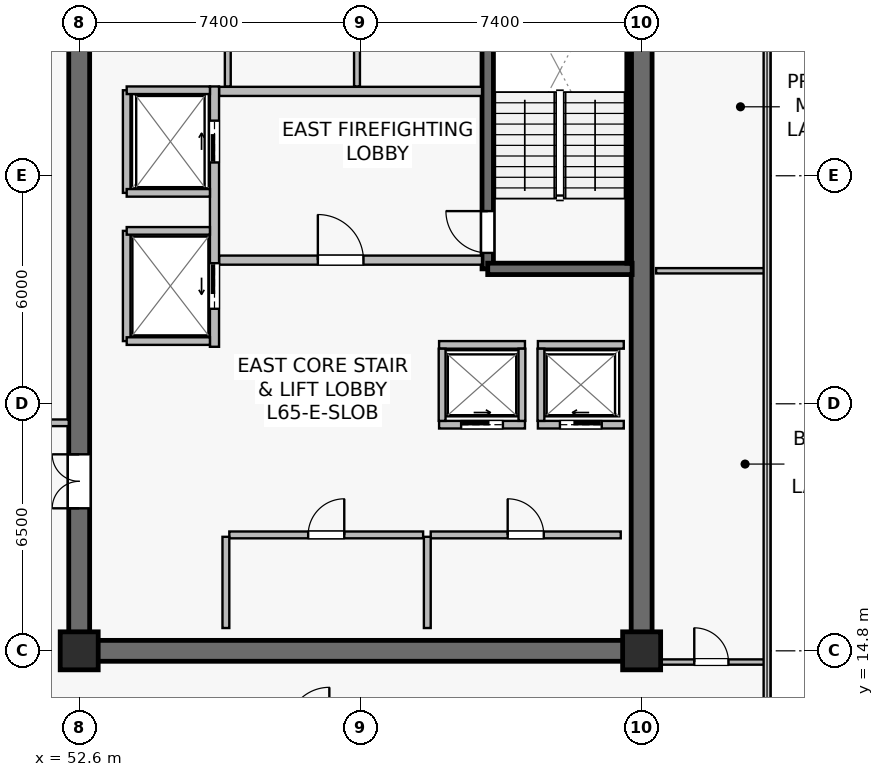
"""IFC4 building model, lengths in metres.
Left out: names, types, materials, properties, quantities, classifications, styles, units other than length and angle.
Written with IfcOpenShell. Run it as: python <this file> out.ifc"""

import sys

from ifc_helpers import new_model, si_unit, direction, frame, frame_2d, origin, origin_2d, place, context, subcontext, project, spatial, rectangle, extrude, source, transform, mapped, element, fill, save


model = new_model("IFC4")
c1 = context("Model", 3, precision=1e-05, world=origin(), true_north=direction((0.0, 1.0)))
c2 = subcontext(c1, "Body", "Model", "MODEL_VIEW")
j1 = project(units=[si_unit("LENGTHUNIT", "METRE"), si_unit("PLANEANGLEUNIT", "RADIAN")], contexts=[c1])
p1 = place(None, origin())
s1 = spatial("IfcSite", under=j1, at=p1, CompositionType="ELEMENT")
p2 = place(p1, origin())
s2 = spatial("IfcBuilding", under=s1, at=p2, CompositionType="ELEMENT")
p3 = place(p2, frame((0.0, 0.0, 271.1)))
s3 = spatial("IfcBuildingStorey", under=s2, at=p3, CompositionType="ELEMENT", Elevation=271.1)
p4 = place(p3, frame((52.325, 14.8, 0.0), z_axis=(0.0, 0.0, 1.0), x_axis=(1.0, 0.0, 0.0)))
e1 = element("IfcWall", 1, at=p4, inside=s3, PredefinedType="SHEAR", context=c2, shape_type="SweptSolid", body=[
    extrude(rectangle(XDim=15.35, YDim=0.55, at=frame_2d((7.675, 0.0))), origin(), (0.0, 0.0, 1.0), 3.8),
])
p5 = place(p3, frame((52.6, 15.075, 0.0), z_axis=(0.0, 0.0, 1.0), x_axis=(0.0, 1.0, 0.0)))
e2 = element("IfcWall", 2, at=p5, inside=s3, PredefinedType="SHEAR", context=c2, shape_type="SweptSolid", body=[
    extrude(rectangle(XDim=18.45, YDim=0.55, at=frame_2d((9.225, 0.0))), origin(), (0.0, 0.0, 1.0), 3.8),
])
p6 = place(p5, frame((3.475, 0.0, 0.0)))
e3 = element("IfcOpeningElement", 3, at=p6, cuts=e2, PredefinedType="OPENING", context=c2, shape_type="SweptSolid", body=[
    extrude(rectangle(XDim=1.42, YDim=2.2, at=frame_2d((0.71, 1.1))), frame((0.0, 0.285, 0.0), z_axis=(0.0, -1.0, 0.0), x_axis=(1.0, 0.0, 0.0)), (0.0, 0.0, 1.0), 0.57),
])
p7 = place(p3, frame((67.4, 15.075, 0.0), z_axis=(0.0, 0.0, 1.0), x_axis=(0.0, 1.0, 0.0)))
e4 = element("IfcWall", 4, at=p7, inside=s3, PredefinedType="SHEAR", context=c2, shape_type="SweptSolid", body=[
    extrude(rectangle(XDim=18.45, YDim=0.55, at=frame_2d((9.225, 0.0))), origin(), (0.0, 0.0, 1.0), 3.8),
])
p8 = place(p3, frame((63.35, 24.85, 0.0), z_axis=(0.0, 0.0, 1.0), x_axis=(0.0, 1.0, 0.0)))
e5 = element("IfcWall", 5, at=p8, inside=s3, PredefinedType="SHEAR", context=c2, shape_type="SweptSolid", body=[
    extrude(rectangle(XDim=8.63, YDim=0.3, at=frame_2d((4.315, 0.0))), origin(), (0.0, 0.0, 1.0), 3.8),
])
p9 = place(p8, frame((0.42, 0.0, 0.0)))
e6 = element("IfcOpeningElement", 6, at=p9, cuts=e5, PredefinedType="OPENING", context=c2, shape_type="SweptSolid", body=[
    extrude(rectangle(XDim=1.1, YDim=2.15, at=frame_2d((0.55, 1.075))), frame((0.0, 0.16, 0.0), z_axis=(0.0, -1.0, 0.0), x_axis=(1.0, 0.0, 0.0)), (0.0, 0.0, 1.0), 0.32),
])
p10 = place(p3, frame((63.35, 24.85, 0.0), z_axis=(0.0, 0.0, 1.0), x_axis=(1.0, 0.0, 0.0)))
e7 = element("IfcWall", 7, at=p10, inside=s3, PredefinedType="SHEAR", context=c2, shape_type="SweptSolid", body=[
    extrude(rectangle(XDim=3.8, YDim=0.3, at=frame_2d((1.9, 0.0))), origin(), (0.0, 0.0, 1.0), 3.8),
])
p11 = place(p3, frame((67.07, 25.0, 0.0), z_axis=(0.0, 0.0, 1.0), x_axis=(0.0, 1.0, 0.0)))
e8 = element("IfcWall", 8, at=p11, inside=s3, PredefinedType="SOLIDWALL", context=c2, shape_type="SweptSolid", body=[
    extrude(rectangle(XDim=8.32, YDim=0.12, at=frame_2d((4.16, 0.0))), origin(), (0.0, 0.0, 1.0), 3.8),
])
m1 = source(origin(), c2, "Body", "SweptSolid", [
    extrude(rectangle(XDim=1.0, YDim=1.0, at=origin_2d()), origin(), (0.0, 0.0, 1.0), 4.1),
])
for number, where, z_axis, x_axis in (
    (9, (52.6, 14.8, 0.0), (0.0, 0.0, 1.0), (1.0, 0.0, 0.0)),
    (10, (67.4, 14.8, 0.0), (0.0, 0.0, 1.0), (1.0, 0.0, 0.0)),
):
    element("IfcColumn", number, at=place(p3, frame(where, z_axis=z_axis, x_axis=x_axis)), inside=s3, PredefinedType="COLUMN", context=c2, shape_type="MappedRepresentation", body=[
        mapped(m1, transform((0.0, 0.0, 0.0), scale=1.0)),
    ])
p12 = place(p3, frame((56.28, 25.08, 0.0), z_axis=(0.0, 0.0, 1.0), x_axis=(1.0, 0.0, 0.0)))
e11 = element("IfcWall", 11, at=p12, inside=s3, PredefinedType="SOLIDWALL", context=c2, shape_type="SweptSolid", body=[
    extrude(rectangle(XDim=6.92, YDim=0.24, at=frame_2d((3.46, 0.0))), origin(), (0.0, 0.0, 1.0), 3.197),
])
p13 = place(p12, frame((2.6, 0.0, 0.0)))
e12 = element("IfcOpeningElement", 12, at=p13, cuts=e11, PredefinedType="OPENING", context=c2, shape_type="SweptSolid", body=[
    extrude(rectangle(XDim=1.2, YDim=2.16, at=frame_2d((0.6, 1.08))), frame((0.0, 0.13, 0.0), z_axis=(0.0, -1.0, 0.0), x_axis=(1.0, 0.0, 0.0)), (0.0, 0.0, 1.0), 0.26),
])
p14 = place(p3, frame((56.28, 29.52, 0.0), z_axis=(0.0, 0.0, 1.0), x_axis=(1.0, 0.0, 0.0)))
e13 = element("IfcWall", 13, at=p14, inside=s3, PredefinedType="SOLIDWALL", context=c2, shape_type="SweptSolid", body=[
    extrude(rectangle(XDim=6.92, YDim=0.24, at=frame_2d((3.46, 0.0))), origin(), (0.0, 0.0, 1.0), 3.197),
])
p15 = place(p3, frame((56.16, 22.8, 0.0), z_axis=(0.0, 0.0, 1.0), x_axis=(0.0, 1.0, 0.0)))
e14 = element("IfcWall", 14, at=p15, inside=s3, PredefinedType="SOLIDWALL", context=c2, shape_type="SweptSolid", body=[
    extrude(rectangle(XDim=6.85, YDim=0.24, at=frame_2d((3.425, 0.0))), origin(), (0.0, 0.0, 1.0), 2.935),
])
p16 = place(p15, frame((4.85, 0.0, 0.0)))
e15 = element("IfcOpeningElement", 15, at=p16, cuts=e14, PredefinedType="OPENING", context=c2, shape_type="SweptSolid", body=[
    extrude(rectangle(XDim=1.1, YDim=2.22, at=frame_2d((0.55, 1.11))), frame((0.0, 0.13, 0.0), z_axis=(0.0, -1.0, 0.0), x_axis=(1.0, 0.0, 0.0)), (0.0, 0.0, 1.0), 0.26),
])
p17 = place(p15, frame((1.0, 0.0, 0.0)))
e16 = element("IfcOpeningElement", 16, at=p17, cuts=e14, PredefinedType="OPENING", context=c2, shape_type="SweptSolid", body=[
    extrude(rectangle(XDim=1.2, YDim=2.22, at=frame_2d((0.6, 1.11))), frame((0.0, 0.13, 0.0), z_axis=(0.0, -1.0, 0.0), x_axis=(1.0, 0.0, 0.0)), (0.0, 0.0, 1.0), 0.26),
])
p18 = place(p3, frame((64.67, 20.75, 0.0), z_axis=(0.0, 0.0, 1.0), x_axis=(1.0, 0.0, 0.0)))
e17 = element("IfcWall", 17, at=p18, inside=s3, PredefinedType="SOLIDWALL", context=c2, shape_type="SweptSolid", body=[
    extrude(rectangle(XDim=2.26, YDim=0.2, at=frame_2d((1.13, 0.0))), origin(), (0.0, 0.0, 1.0), 3.8),
])
p19 = place(p18, frame((0.58, 0.0, 0.0)))
e18 = element("IfcOpeningElement", 18, at=p19, cuts=e17, PredefinedType="OPENING", context=c2, shape_type="SweptSolid", body=[
    extrude(rectangle(XDim=1.1, YDim=2.22, at=frame_2d((0.55, 1.11))), frame((0.0, 0.11, 0.0), z_axis=(0.0, -1.0, 0.0), x_axis=(1.0, 0.0, 0.0)), (0.0, 0.0, 1.0), 0.22),
])
p20 = place(p3, frame((64.67, 22.85, 0.0), z_axis=(0.0, 0.0, 1.0), x_axis=(1.0, 0.0, 0.0)))
e19 = element("IfcWall", 19, at=p20, inside=s3, PredefinedType="SOLIDWALL", context=c2, shape_type="SweptSolid", body=[
    extrude(rectangle(XDim=2.26, YDim=0.2, at=frame_2d((1.13, 0.0))), origin(), (0.0, 0.0, 1.0), 3.8),
])
p21 = place(p3, frame((64.75, 20.85, 0.0), z_axis=(0.0, 0.0, 1.0), x_axis=(0.0, 1.0, 0.0)))
e20 = element("IfcWall", 20, at=p21, inside=s3, PredefinedType="SOLIDWALL", context=c2, shape_type="SweptSolid", body=[
    extrude(rectangle(XDim=1.9, YDim=0.18, at=frame_2d((0.95, 0.0))), origin(), (0.0, 0.0, 1.0), 3.8),
])
p22 = place(p3, frame((62.07, 20.75, 0.0), z_axis=(0.0, 0.0, 1.0), x_axis=(1.0, 0.0, 0.0)))
e21 = element("IfcWall", 21, at=p22, inside=s3, PredefinedType="SOLIDWALL", context=c2, shape_type="SweptSolid", body=[
    extrude(rectangle(XDim=2.26, YDim=0.2, at=frame_2d((1.13, 0.0))), origin(), (0.0, 0.0, 1.0), 3.8),
])
p23 = place(p22, frame((0.58, 0.0, 0.0)))
e22 = element("IfcOpeningElement", 22, at=p23, cuts=e21, PredefinedType="OPENING", context=c2, shape_type="SweptSolid", body=[
    extrude(rectangle(XDim=1.1, YDim=2.22, at=frame_2d((0.55, 1.11))), frame((0.0, 0.11, 0.0), z_axis=(0.0, -1.0, 0.0), x_axis=(1.0, 0.0, 0.0)), (0.0, 0.0, 1.0), 0.22),
])
p24 = place(p3, frame((62.07, 22.85, 0.0), z_axis=(0.0, 0.0, 1.0), x_axis=(1.0, 0.0, 0.0)))
e23 = element("IfcWall", 23, at=p24, inside=s3, PredefinedType="SOLIDWALL", context=c2, shape_type="SweptSolid", body=[
    extrude(rectangle(XDim=2.26, YDim=0.2, at=frame_2d((1.13, 0.0))), origin(), (0.0, 0.0, 1.0), 3.8),
])
for number, where, z_axis, x_axis in (
    (24, (62.15, 20.85, 0.0), (0.0, 0.0, 1.0), (0.0, 1.0, 0.0)),
    (25, (64.25, 20.85, 0.0), (0.0, 0.0, 1.0), (0.0, 1.0, 0.0)),
):
    element("IfcWall", number, at=place(p3, frame(where, z_axis=z_axis, x_axis=x_axis)), inside=s3, PredefinedType="SOLIDWALL", context=c2, shape_type="SweptSolid", body=[
        extrude(rectangle(XDim=1.9, YDim=0.18, at=frame_2d((0.95, 0.0))), origin(), (0.0, 0.0, 1.0), 3.8),
    ])
p25 = place(p3, frame((53.85, 26.85, 0.0), z_axis=(0.0, 0.0, 1.0), x_axis=(0.0, 1.0, 0.0)))
e26 = element("IfcWall", 26, at=p25, inside=s3, PredefinedType="SOLIDWALL", context=c2, shape_type="SweptSolid", body=[
    extrude(rectangle(XDim=2.7, YDim=0.2, at=frame_2d((1.35, 0.0))), origin(), (0.0, 0.0, 1.0), 3.8),
])
p26 = place(p3, frame((53.85, 29.55, 0.0), z_axis=(0.0, 0.0, 1.0), x_axis=(1.0, 0.0, 0.0)))
e27 = element("IfcWall", 27, at=p26, inside=s3, PredefinedType="SOLIDWALL", context=c2, shape_type="SweptSolid", body=[
    extrude(rectangle(XDim=2.19, YDim=0.2, at=frame_2d((1.095, 0.0))), origin(), (0.0, 0.0, 1.0), 3.8),
])
p27 = place(p3, frame((53.85, 26.85, 0.0), z_axis=(0.0, 0.0, 1.0), x_axis=(1.0, 0.0, 0.0)))
e28 = element("IfcWall", 28, at=p27, inside=s3, PredefinedType="SOLIDWALL", context=c2, shape_type="SweptSolid", body=[
    extrude(rectangle(XDim=2.19, YDim=0.2, at=frame_2d((1.095, 0.0))), origin(), (0.0, 0.0, 1.0), 3.197),
])
p28 = place(p3, frame((53.85, 22.95, 0.0), z_axis=(0.0, 0.0, 1.0), x_axis=(0.0, 1.0, 0.0)))
e29 = element("IfcWall", 29, at=p28, inside=s3, PredefinedType="SOLIDWALL", context=c2, shape_type="SweptSolid", body=[
    extrude(rectangle(XDim=2.9, YDim=0.2, at=frame_2d((1.45, 0.0))), origin(), (0.0, 0.0, 1.0), 2.935),
])
for number, where, z_axis, x_axis in (
    (30, (53.85, 25.85, 0.0), (0.0, 0.0, 1.0), (1.0, 0.0, 0.0)),
    (31, (53.85, 22.95, 0.0), (0.0, 0.0, 1.0), (1.0, 0.0, 0.0)),
):
    element("IfcWall", number, at=place(p3, frame(where, z_axis=z_axis, x_axis=x_axis)), inside=s3, PredefinedType="SOLIDWALL", context=c2, shape_type="SweptSolid", body=[
        extrude(rectangle(XDim=2.19, YDim=0.2, at=frame_2d((1.095, 0.0))), origin(), (0.0, 0.0, 1.0), 3.8),
    ])
p29 = place(p3, frame((61.85, 17.85, 0.0), z_axis=(0.0, 0.0, 1.0), x_axis=(1.0, 0.0, 0.0)))
e32 = element("IfcWall", 32, at=p29, inside=s3, PredefinedType="SOLIDWALL", context=c2, shape_type="SweptSolid", body=[
    extrude(rectangle(XDim=5.0, YDim=0.18, at=frame_2d((2.5, 0.0))), origin(), (0.0, 0.0, 1.0), 3.8),
])
p30 = place(p29, frame((2.025, 0.0, 0.0)))
e33 = element("IfcOpeningElement", 33, at=p30, cuts=e32, PredefinedType="OPENING", context=c2, shape_type="SweptSolid", body=[
    extrude(rectangle(XDim=0.95, YDim=2.15, at=frame_2d((0.475, 1.075))), frame((0.0, 0.1, 0.0), z_axis=(0.0, -1.0, 0.0), x_axis=(1.0, 0.0, 0.0)), (0.0, 0.0, 1.0), 0.2),
])
p31 = place(p3, frame((61.76, 15.4, 0.0), z_axis=(0.0, 0.0, 1.0), x_axis=(0.0, 1.0, 0.0)))
e34 = element("IfcWall", 34, at=p31, inside=s3, PredefinedType="SOLIDWALL", context=c2, shape_type="SweptSolid", body=[
    extrude(rectangle(XDim=2.4, YDim=0.18, at=frame_2d((1.2, 0.0))), origin(), (0.0, 0.0, 1.0), 3.8),
])
p32 = place(p3, frame((56.55, 17.85, 0.0), z_axis=(0.0, 0.0, 1.0), x_axis=(1.0, 0.0, 0.0)))
e35 = element("IfcWall", 35, at=p32, inside=s3, PredefinedType="SOLIDWALL", context=c2, shape_type="SweptSolid", body=[
    extrude(rectangle(XDim=5.1, YDim=0.18, at=frame_2d((2.55, 0.0))), origin(), (0.0, 0.0, 1.0), 3.197),
])
p33 = place(p32, frame((2.075, 0.0, 0.0)))
e36 = element("IfcOpeningElement", 36, at=p33, cuts=e35, PredefinedType="OPENING", context=c2, shape_type="SweptSolid", body=[
    extrude(rectangle(XDim=0.95, YDim=2.15, at=frame_2d((0.475, 1.075))), frame((0.0, 0.1, 0.0), z_axis=(0.0, -1.0, 0.0), x_axis=(1.0, 0.0, 0.0)), (0.0, 0.0, 1.0), 0.2),
])
p34 = place(p3, frame((56.46, 15.4, 0.0), z_axis=(0.0, 0.0, 1.0), x_axis=(0.0, 1.0, 0.0)))
e37 = element("IfcWall", 37, at=p34, inside=s3, PredefinedType="SOLIDWALL", context=c2, shape_type="SweptSolid", body=[
    extrude(rectangle(XDim=2.4, YDim=0.18, at=frame_2d((1.2, 0.0))), origin(), (0.0, 0.0, 1.0), 3.8),
])
p35 = place(p3, frame((59.91, 29.65, 0.0), z_axis=(0.0, 0.0, 1.0), x_axis=(0.0, 1.0, 0.0)))
e38 = element("IfcWall", 38, at=p35, inside=s3, PredefinedType="PLUMBINGWALL", context=c2, shape_type="SweptSolid", body=[
    extrude(rectangle(XDim=3.93, YDim=0.155, at=frame_2d((1.965, 0.0))), origin(), (0.0, 0.0, 1.0), 3.197),
])
p36 = place(p3, frame((56.51, 29.65, 0.0), z_axis=(0.0, 0.0, 1.0), x_axis=(0.0, 1.0, 0.0)))
e39 = element("IfcWall", 39, at=p36, inside=s3, PredefinedType="PLUMBINGWALL", context=c2, shape_type="SweptSolid", body=[
    extrude(rectangle(XDim=3.93, YDim=0.155, at=frame_2d((1.965, 0.0))), origin(), (0.0, 0.0, 1.0), 3.8),
])
p37 = place(p3, frame((48.3, 20.8, 0.0), z_axis=(0.0, 0.0, 1.0), x_axis=(1.0, 0.0, 0.0)))
e40 = element("IfcWall", 40, at=p37, inside=s3, PredefinedType="PARTITIONING", context=c2, shape_type="SweptSolid", body=[
    extrude(rectangle(XDim=4.025, YDim=0.175, at=frame_2d((2.012, 0.0))), origin(), (0.0, 0.0, 1.0), 3.8),
])
p38 = place(p37, frame((1.35, 0.0, 0.0)))
e41 = element("IfcOpeningElement", 41, at=p38, cuts=e40, PredefinedType="OPENING", context=c2, shape_type="SweptSolid", body=[
    extrude(rectangle(XDim=0.95, YDim=2.15, at=frame_2d((0.475, 1.075))), frame((0.0, 0.098, 0.0), z_axis=(0.0, -1.0, 0.0), x_axis=(1.0, 0.0, 0.0)), (0.0, 0.0, 1.0), 0.195),
])
p39 = place(p3, frame((67.78, 24.8, 0.0), z_axis=(0.0, 0.0, 1.0), x_axis=(1.0, 0.0, 0.0)))
e42 = element("IfcWall", 42, at=p39, inside=s3, PredefinedType="PARTITIONING", context=c2, shape_type="SweptSolid", body=[
    extrude(rectangle(XDim=2.91, YDim=0.14, at=frame_2d((1.455, 0.0))), origin(), (0.0, 0.0, 1.0), 3.8),
])
p40 = place(p3, frame((67.78, 14.505, 0.0), z_axis=(0.0, 0.0, 1.0), x_axis=(1.0, 0.0, 0.0)))
e43 = element("IfcWall", 43, at=p40, inside=s3, PredefinedType="PARTITIONING", context=c2, shape_type="SweptSolid", body=[
    extrude(rectangle(XDim=2.91, YDim=0.14, at=frame_2d((1.455, 0.0))), origin(), (0.0, 0.0, 1.0), 3.8),
])
p41 = place(p40, frame((1.005, 0.0, 0.0)))
e44 = element("IfcOpeningElement", 44, at=p41, cuts=e43, PredefinedType="OPENING", context=c2, shape_type="SweptSolid", body=[
    extrude(rectangle(XDim=0.9, YDim=2.1, at=frame_2d((0.45, 1.05))), frame((0.0, 0.08, 0.0), z_axis=(0.0, -1.0, 0.0), x_axis=(1.0, 0.0, 0.0)), (0.0, 0.0, 1.0), 0.16),
])
m2 = source(origin(), c2, "Body", "SweptSolid", [
    extrude(rectangle(XDim=1.1, YDim=2.15, at=frame_2d((0.55, 1.075))), frame((0.0, 0.025, 0.0), z_axis=(0.0, -1.0, 0.0), x_axis=(1.0, 0.0, 0.0)), (0.0, 0.0, 1.0), 0.05),
])
p42 = place(p9, origin())
e45 = element("IfcDoor", 45, at=p42, inside=s3, OperationType="SINGLE_SWING_RIGHT", PredefinedType="DOOR", context=c2, shape_type="MappedRepresentation", body=[
    mapped(m2, transform((0.0, 0.0, 0.0), scale=1.0)),
])
fill(e6, e45)
m3 = source(origin(), c2, "Body", "SweptSolid", [
    extrude(rectangle(XDim=1.2, YDim=2.16, at=frame_2d((0.6, 1.08))), frame((0.0, 0.025, 0.0), z_axis=(0.0, -1.0, 0.0), x_axis=(1.0, 0.0, 0.0)), (0.0, 0.0, 1.0), 0.05),
])
p43 = place(p13, origin())
e46 = element("IfcDoor", 46, at=p43, inside=s3, OperationType="SINGLE_SWING_LEFT", PredefinedType="DOOR", context=c2, shape_type="MappedRepresentation", body=[
    mapped(m3, transform((0.0, 0.0, 0.0), scale=1.0)),
])
fill(e12, e46)
m4 = source(origin(), c2, "Body", "SweptSolid", [
    extrude(rectangle(XDim=1.1, YDim=2.22, at=frame_2d((0.55, 1.11))), frame((0.0, 0.025, 0.0), z_axis=(0.0, -1.0, 0.0), x_axis=(1.0, 0.0, 0.0)), (0.0, 0.0, 1.0), 0.05),
])
p44 = place(p19, origin())
e47 = element("IfcDoor", 47, at=p44, inside=s3, OperationType="SLIDING_TO_LEFT", PredefinedType="USERDEFINED", context=c2, shape_type="MappedRepresentation", body=[
    mapped(m4, transform((0.0, 0.0, 0.0), scale=1.0)),
])
fill(e18, e47)
p45 = place(p23, origin())
e48 = element("IfcDoor", 48, at=p45, inside=s3, OperationType="SLIDING_TO_RIGHT", PredefinedType="USERDEFINED", context=c2, shape_type="MappedRepresentation", body=[
    mapped(m4, transform((0.0, 0.0, 0.0), scale=1.0)),
])
fill(e22, e48)
p46 = place(p16, origin())
e49 = element("IfcDoor", 49, at=p46, inside=s3, OperationType="SLIDING_TO_RIGHT", PredefinedType="USERDEFINED", context=c2, shape_type="MappedRepresentation", body=[
    mapped(m4, transform((0.0, 0.0, 0.0), scale=1.0)),
])
fill(e15, e49)
m5 = source(origin(), c2, "Body", "SweptSolid", [
    extrude(rectangle(XDim=1.2, YDim=2.22, at=frame_2d((0.6, 1.11))), frame((0.0, 0.025, 0.0), z_axis=(0.0, -1.0, 0.0), x_axis=(1.0, 0.0, 0.0)), (0.0, 0.0, 1.0), 0.05),
])
p47 = place(p17, origin())
e50 = element("IfcDoor", 50, at=p47, inside=s3, OperationType="SLIDING_TO_LEFT", PredefinedType="USERDEFINED", context=c2, shape_type="MappedRepresentation", body=[
    mapped(m5, transform((0.0, 0.0, 0.0), scale=1.0)),
])
fill(e16, e50)
m6 = source(origin(), c2, "Body", "SweptSolid", [
    extrude(rectangle(XDim=0.95, YDim=2.15, at=frame_2d((0.475, 1.075))), frame((0.0, 0.025, 0.0), z_axis=(0.0, -1.0, 0.0), x_axis=(1.0, 0.0, 0.0)), (0.0, 0.0, 1.0), 0.05),
])
p48 = place(p30, origin())
e51 = element("IfcDoor", 51, at=p48, inside=s3, OperationType="SINGLE_SWING_LEFT", PredefinedType="DOOR", context=c2, shape_type="MappedRepresentation", body=[
    mapped(m6, transform((0.0, 0.0, 0.0), scale=1.0)),
])
fill(e33, e51)
p49 = place(p33, origin())
e52 = element("IfcDoor", 52, at=p49, inside=s3, OperationType="SINGLE_SWING_RIGHT", PredefinedType="DOOR", context=c2, shape_type="MappedRepresentation", body=[
    mapped(m6, transform((0.0, 0.0, 0.0), scale=1.0)),
])
fill(e36, e52)
m7 = source(origin(), c2, "Body", "SweptSolid", [
    extrude(rectangle(XDim=1.42, YDim=2.2, at=frame_2d((0.71, 1.1))), frame((0.0, 0.025, 0.0), z_axis=(0.0, -1.0, 0.0), x_axis=(1.0, 0.0, 0.0)), (0.0, 0.0, 1.0), 0.05),
])
p50 = place(p6, origin())
e53 = element("IfcDoor", 53, at=p50, inside=s3, OperationType="DOUBLE_DOOR_SINGLE_SWING", PredefinedType="DOOR", context=c2, shape_type="MappedRepresentation", body=[
    mapped(m7, transform((0.0, 0.0, 0.0), scale=1.0)),
])
fill(e3, e53)
m8 = source(origin(), c2, "Body", "SweptSolid", [
    extrude(rectangle(XDim=0.9, YDim=2.1, at=frame_2d((0.45, 1.05))), frame((0.0, 0.025, 0.0), z_axis=(0.0, -1.0, 0.0), x_axis=(1.0, 0.0, 0.0)), (0.0, 0.0, 1.0), 0.05),
])
p51 = place(p41, origin())
e54 = element("IfcDoor", 54, at=p51, inside=s3, OperationType="SINGLE_SWING_LEFT", PredefinedType="DOOR", context=c2, shape_type="MappedRepresentation", body=[
    mapped(m8, transform((0.0, 0.0, 0.0), scale=1.0)),
])
fill(e44, e54)
save(model, sys.argv[1])
